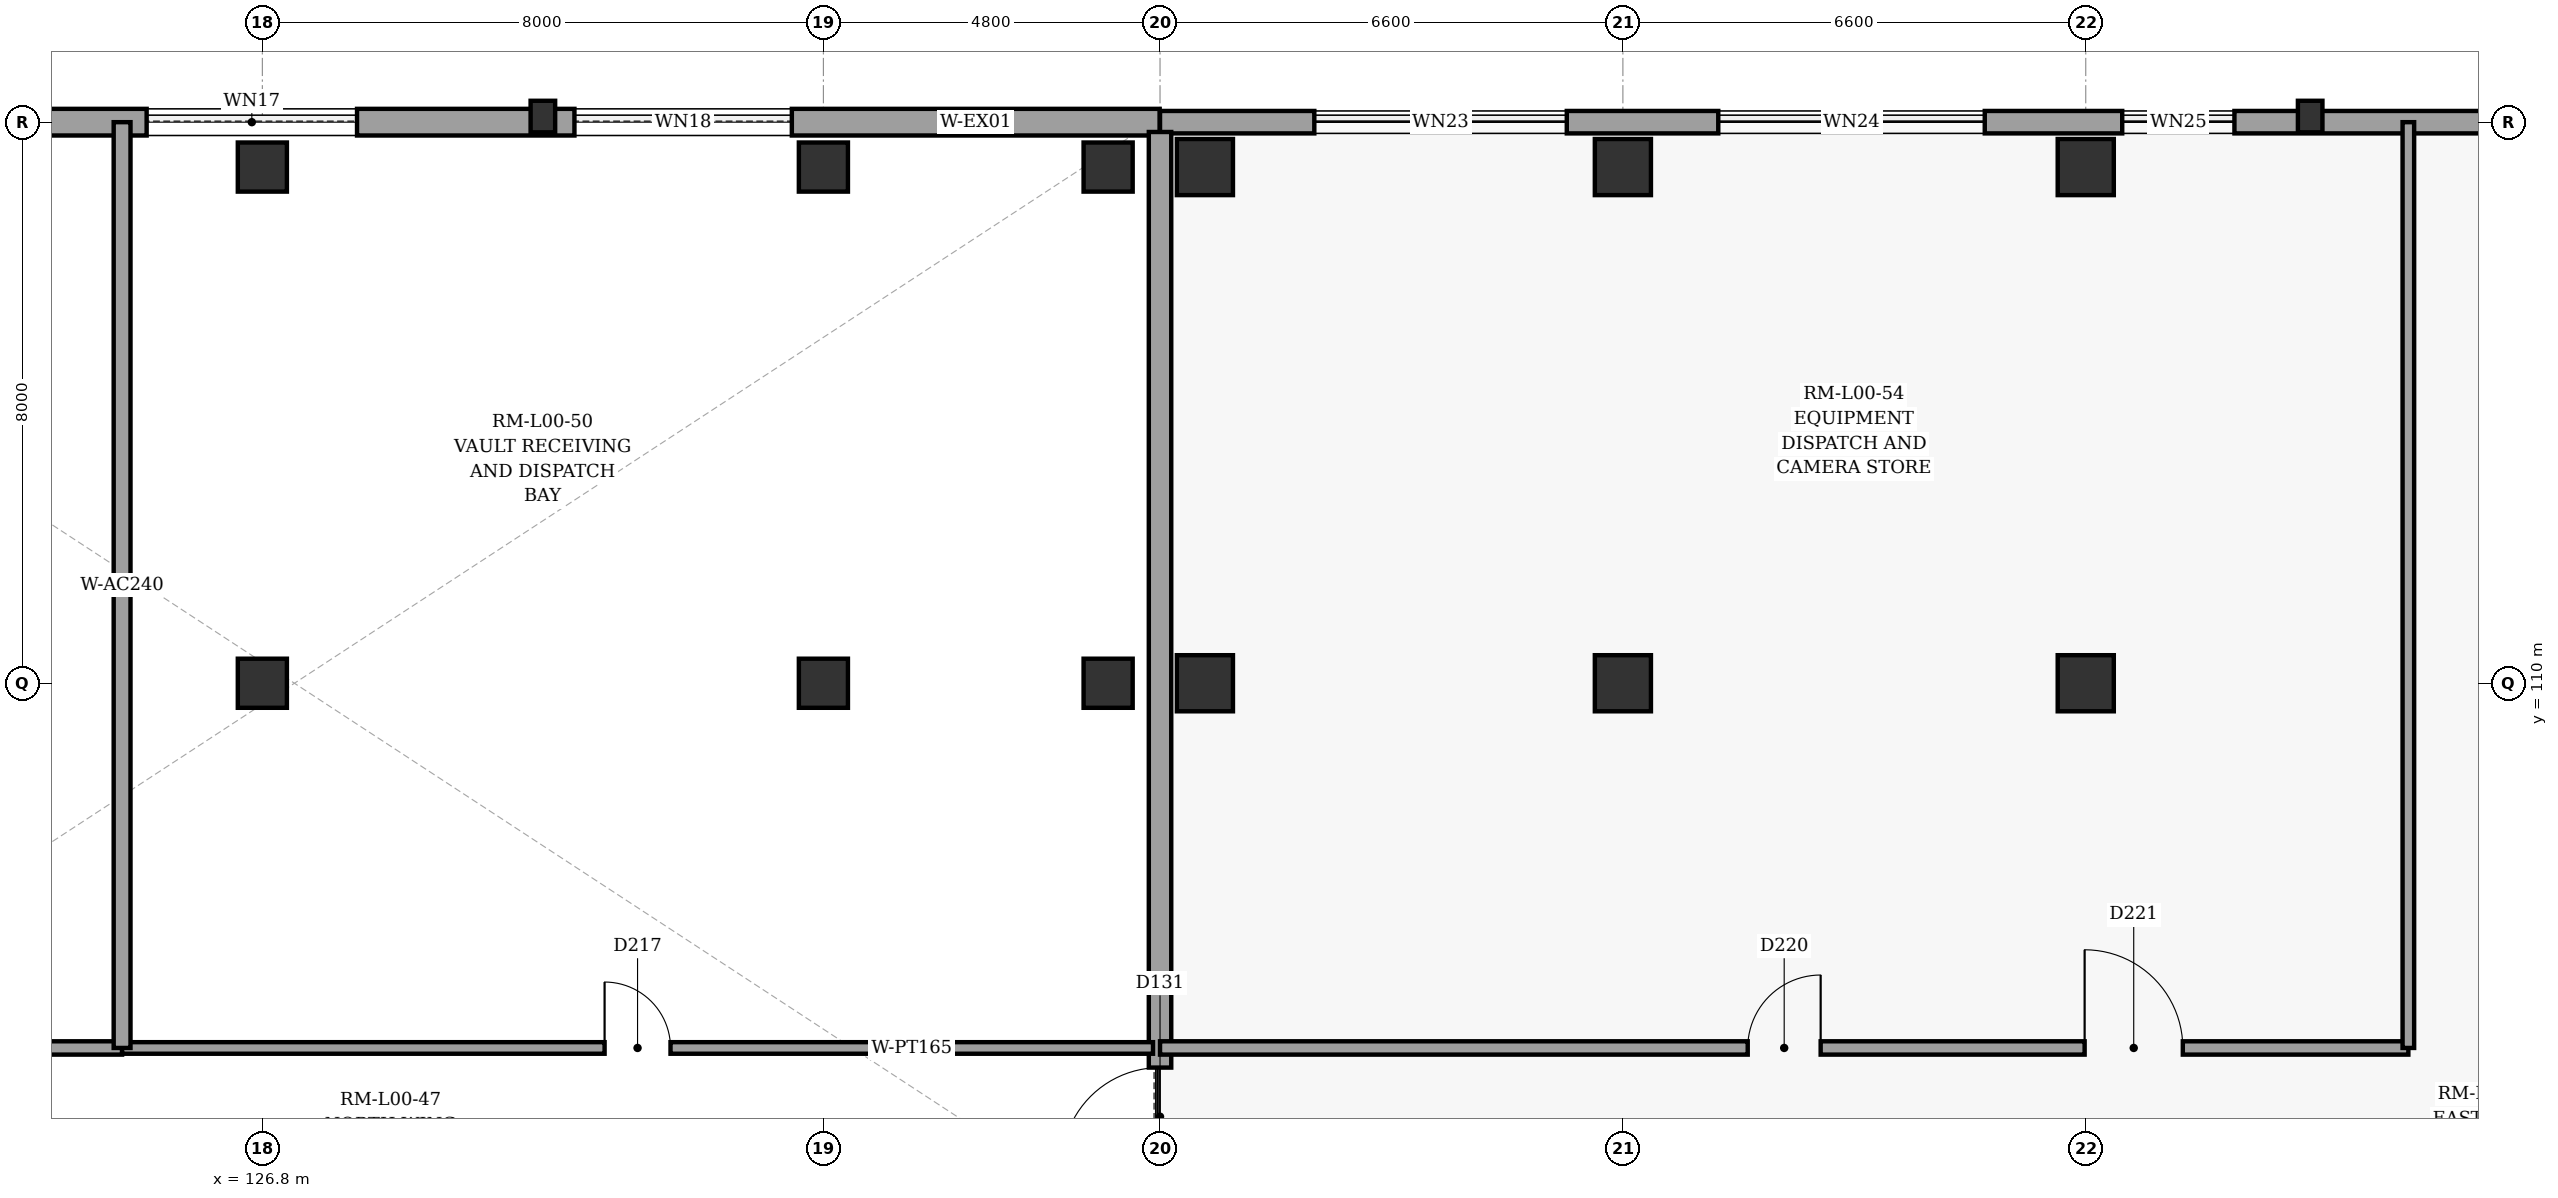
"""IFC4 building model, lengths in metres.
Left out: names, types, materials, properties, quantities, classifications, styles, units other than length and angle.
Written with IfcOpenShell. Run it as: python <this file> out.ifc"""

import sys

from ifc_helpers import new_model, si_unit, direction, frame, frame_2d, origin, origin_2d, place, context, subcontext, project, spatial, rectangle, extrude, element, fill, save


model = new_model("IFC4")
c1 = context("Model", 3, precision=1e-05, world=origin(), true_north=direction((0.0, 1.0)))
c2 = subcontext(c1, "Body", "Model", "MODEL_VIEW")
j1 = project(units=[si_unit("LENGTHUNIT", "METRE"), si_unit("PLANEANGLEUNIT", "RADIAN")], contexts=[c1])
p1 = place(None, origin())
s1 = spatial("IfcSite", under=j1, at=p1, CompositionType="ELEMENT")
p2 = place(p1, origin())
s2 = spatial("IfcBuilding", under=s1, at=p2, CompositionType="ELEMENT")
p3 = place(p2, origin())
s3 = spatial("IfcBuildingStorey", under=s2, at=p3, CompositionType="ELEMENT", Elevation=0.0)
for number, where, z_axis, x_axis in (
    (1, (126.8, 110.0, 0.0), (0.0, 0.0, 1.0), (1.0, 0.0, 0.0)),
    (2, (126.8, 117.36, 0.0), (0.0, 0.0, 1.0), (1.0, 0.0, 0.0)),
    (3, (134.8, 110.0, 0.0), (0.0, 0.0, 1.0), (1.0, 0.0, 0.0)),
    (4, (134.8, 117.36, 0.0), (0.0, 0.0, 1.0), (1.0, 0.0, 0.0)),
    (5, (138.86, 110.0, 0.0), (0.0, 0.0, 1.0), (1.0, 0.0, 0.0)),
    (6, (138.86, 117.36, 0.0), (0.0, 0.0, 1.0), (1.0, 0.0, 0.0)),
):
    element("IfcColumn", number, at=place(p3, frame(where, z_axis=z_axis, x_axis=x_axis)), inside=s3, PredefinedType="COLUMN", context=c2, shape_type="SweptSolid", body=[
        extrude(rectangle(XDim=0.7, YDim=0.7, at=origin_2d()), origin(), (0.0, 0.0, 1.0), 5.4),
    ])
for number, where, z_axis, x_axis in (
    (7, (140.24, 110.0, 0.0), (0.0, 0.0, 1.0), (1.0, 0.0, 0.0)),
    (8, (140.24, 117.36, 0.0), (0.0, 0.0, 1.0), (1.0, 0.0, 0.0)),
    (9, (146.2, 110.0, 0.0), (0.0, 0.0, 1.0), (1.0, 0.0, 0.0)),
    (10, (146.2, 117.36, 0.0), (0.0, 0.0, 1.0), (1.0, 0.0, 0.0)),
    (11, (152.8, 110.0, 0.0), (0.0, 0.0, 1.0), (1.0, 0.0, 0.0)),
    (12, (152.8, 117.36, 0.0), (0.0, 0.0, 1.0), (1.0, 0.0, 0.0)),
):
    element("IfcColumn", number, at=place(p3, frame(where, z_axis=z_axis, x_axis=x_axis)), inside=s3, PredefinedType="COLUMN", context=c2, shape_type="SweptSolid", body=[
        extrude(rectangle(XDim=0.8, YDim=0.8, at=origin_2d()), origin(), (0.0, 0.0, 1.0), 5.4),
    ])
for number, where, z_axis, x_axis in (
    (13, (130.8, 118.08, 0.0), (0.0, 0.0, 1.0), (0.0, 1.0, 0.0)),
    (14, (156.0, 118.08, 0.0), (0.0, 0.0, 1.0), (0.0, 1.0, 0.0)),
):
    element("IfcColumn", number, at=place(p3, frame(where, z_axis=z_axis, x_axis=x_axis)), inside=s3, PredefinedType="PILASTER", context=c2, shape_type="SweptSolid", body=[
        extrude(rectangle(XDim=0.35, YDim=0.45, at=origin_2d()), origin(), (0.0, 0.0, 1.0), 5.4),
    ])
p4 = place(p3, frame((94.8, 118.0, 0.0), z_axis=(0.0, 0.0, 1.0), x_axis=(1.0, 0.0, 0.0)))
e15 = element("IfcWall", 15, at=p4, inside=s3, PredefinedType="SOLIDWALL", context=c2, shape_type="SweptSolid", body=[
    extrude(rectangle(XDim=44.795, YDim=0.38, at=frame_2d((22.397, 0.0))), origin(), (0.0, 0.0, 1.0), 5.12),
])
p5 = place(p4, frame((0.75, 0.0, 0.9)))
e16 = element("IfcOpeningElement", 16, at=p5, cuts=e15, PredefinedType="OPENING", context=c2, shape_type="SweptSolid", body=[
    extrude(rectangle(XDim=2.6, YDim=2.35, at=frame_2d((1.3, 1.175))), frame((0.0, 0.2, 0.0), z_axis=(0.0, -1.0, 0.0), x_axis=(1.0, 0.0, 0.0)), (0.0, 0.0, 1.0), 0.4),
])
p6 = place(p4, frame((8.3, 0.0, 0.9)))
e17 = element("IfcOpeningElement", 17, at=p6, cuts=e15, PredefinedType="OPENING", context=c2, shape_type="SweptSolid", body=[
    extrude(rectangle(XDim=2.7, YDim=2.35, at=frame_2d((1.35, 1.175))), frame((0.0, 0.2, 0.0), z_axis=(0.0, -1.0, 0.0), x_axis=(1.0, 0.0, 0.0)), (0.0, 0.0, 1.0), 0.4),
])
p7 = place(p4, frame((15.9, 0.0, 0.9)))
e18 = element("IfcOpeningElement", 18, at=p7, cuts=e15, PredefinedType="OPENING", context=c2, shape_type="SweptSolid", body=[
    extrude(rectangle(XDim=2.8, YDim=2.4, at=frame_2d((1.4, 1.2))), frame((0.0, 0.2, 0.0), z_axis=(0.0, -1.0, 0.0), x_axis=(1.0, 0.0, 0.0)), (0.0, 0.0, 1.0), 0.4),
])
p8 = place(p4, frame((22.75, 0.0, 0.9)))
e19 = element("IfcOpeningElement", 19, at=p8, cuts=e15, PredefinedType="OPENING", context=c2, shape_type="SweptSolid", body=[
    extrude(rectangle(XDim=2.9, YDim=2.4, at=frame_2d((1.45, 1.2))), frame((0.0, 0.2, 0.0), z_axis=(0.0, -1.0, 0.0), x_axis=(1.0, 0.0, 0.0)), (0.0, 0.0, 1.0), 0.4),
])
p9 = place(p4, frame((30.35, 0.0, 0.9)))
e20 = element("IfcOpeningElement", 20, at=p9, cuts=e15, PredefinedType="OPENING", context=c2, shape_type="SweptSolid", body=[
    extrude(rectangle(XDim=3.0, YDim=2.45, at=frame_2d((1.5, 1.225))), frame((0.0, 0.2, 0.0), z_axis=(0.0, -1.0, 0.0), x_axis=(1.0, 0.0, 0.0)), (0.0, 0.0, 1.0), 0.4),
])
p10 = place(p4, frame((36.45, 0.0, 0.9)))
e21 = element("IfcOpeningElement", 21, at=p10, cuts=e15, PredefinedType="OPENING", context=c2, shape_type="SweptSolid", body=[
    extrude(rectangle(XDim=3.1, YDim=2.45, at=frame_2d((1.55, 1.225))), frame((0.0, 0.2, 0.0), z_axis=(0.0, -1.0, 0.0), x_axis=(1.0, 0.0, 0.0)), (0.0, 0.0, 1.0), 0.4),
])
p11 = place(p3, frame((139.6, 118.0, 0.0), z_axis=(0.0, 0.0, 1.0), x_axis=(1.0, 0.0, 0.0)))
e22 = element("IfcWall", 22, at=p11, inside=s3, PredefinedType="SOLIDWALL", context=c2, shape_type="SweptSolid", body=[
    extrude(rectangle(XDim=32.4, YDim=0.32, at=frame_2d((16.2, 0.0))), origin(), (0.0, 0.0, 1.0), 5.14),
])
p12 = place(p11, frame((28.5, 0.0, 0.0)))
e23 = element("IfcOpeningElement", 23, at=p12, cuts=e22, PredefinedType="OPENING", context=c2, shape_type="SweptSolid", body=[
    extrude(rectangle(XDim=2.0, YDim=2.5, at=frame_2d((1.0, 1.25))), frame((0.0, 0.17, 0.0), z_axis=(0.0, -1.0, 0.0), x_axis=(1.0, 0.0, 0.0)), (0.0, 0.0, 1.0), 0.34),
])
p13 = place(p11, frame((2.2, 0.0, 0.9)))
e24 = element("IfcOpeningElement", 24, at=p13, cuts=e22, PredefinedType="OPENING", context=c2, shape_type="SweptSolid", body=[
    extrude(rectangle(XDim=3.6, YDim=2.6, at=frame_2d((1.8, 1.3))), frame((0.0, 0.17, 0.0), z_axis=(0.0, -1.0, 0.0), x_axis=(1.0, 0.0, 0.0)), (0.0, 0.0, 1.0), 0.34),
])
p14 = place(p11, frame((7.96, 0.0, 0.9)))
e25 = element("IfcOpeningElement", 25, at=p14, cuts=e22, PredefinedType="OPENING", context=c2, shape_type="SweptSolid", body=[
    extrude(rectangle(XDim=3.8, YDim=2.6, at=frame_2d((1.9, 1.3))), frame((0.0, 0.17, 0.0), z_axis=(0.0, -1.0, 0.0), x_axis=(1.0, 0.0, 0.0)), (0.0, 0.0, 1.0), 0.34),
])
p15 = place(p11, frame((13.72, 0.0, 0.9)))
e26 = element("IfcOpeningElement", 26, at=p15, cuts=e22, PredefinedType="OPENING", context=c2, shape_type="SweptSolid", body=[
    extrude(rectangle(XDim=1.6, YDim=1.65, at=frame_2d((0.8, 0.825))), frame((0.0, 0.17, 0.0), z_axis=(0.0, -1.0, 0.0), x_axis=(1.0, 0.0, 0.0)), (0.0, 0.0, 1.0), 0.34),
])
p16 = place(p11, frame((19.48, 0.0, 0.9)))
e27 = element("IfcOpeningElement", 27, at=p16, cuts=e22, PredefinedType="OPENING", context=c2, shape_type="SweptSolid", body=[
    extrude(rectangle(XDim=1.8, YDim=1.65, at=frame_2d((0.9, 0.825))), frame((0.0, 0.17, 0.0), z_axis=(0.0, -1.0, 0.0), x_axis=(1.0, 0.0, 0.0)), (0.0, 0.0, 1.0), 0.34),
])
p17 = place(p3, frame((139.6, 71.74, 0.0), z_axis=(0.0, 0.0, 1.0), x_axis=(0.0, 1.0, 0.0)))
e28 = element("IfcWall", 28, at=p17, inside=s3, PredefinedType="SOLIDWALL", context=c2, shape_type="SweptSolid", body=[
    extrude(rectangle(XDim=46.12, YDim=0.32, at=frame_2d((23.06, 0.0))), origin(), (0.0, 0.0, 1.0), 4.29),
])
p18 = place(p17, frame((31.38, 0.0, 0.0)))
e29 = element("IfcOpeningElement", 29, at=p18, cuts=e28, PredefinedType="OPENING", context=c2, shape_type="SweptSolid", body=[
    extrude(rectangle(XDim=1.4, YDim=2.25, at=frame_2d((0.7, 1.125))), frame((0.0, 0.17, 0.0), z_axis=(0.0, -1.0, 0.0), x_axis=(1.0, 0.0, 0.0)), (0.0, 0.0, 1.0), 0.34),
])
p19 = place(p3, frame((109.8, 104.8, 0.0), z_axis=(0.0, 0.0, 1.0), x_axis=(1.0, 0.0, 0.0)))
e30 = element("IfcWall", 30, at=p19, inside=s3, PredefinedType="PARTITIONING", context=c2, shape_type="SweptSolid", body=[
    extrude(rectangle(XDim=15.0, YDim=0.19, at=frame_2d((7.5, 0.0))), origin(), (0.0, 0.0, 1.0), 5.12),
])
p20 = place(p19, frame((6.625, 0.0, 0.0)))
e31 = element("IfcOpeningElement", 31, at=p20, cuts=e30, PredefinedType="OPENING", context=c2, shape_type="SweptSolid", body=[
    extrude(rectangle(XDim=1.75, YDim=2.35, at=frame_2d((0.875, 1.175))), frame((0.0, 0.105, 0.0), z_axis=(0.0, -1.0, 0.0), x_axis=(1.0, 0.0, 0.0)), (0.0, 0.0, 1.0), 0.21),
])
p21 = place(p3, frame((124.8, 104.8, 0.0), z_axis=(0.0, 0.0, 1.0), x_axis=(1.0, 0.0, 0.0)))
e32 = element("IfcWall", 32, at=p21, inside=s3, PredefinedType="PARTITIONING", context=c2, shape_type="SweptSolid", body=[
    extrude(rectangle(XDim=14.7, YDim=0.165, at=frame_2d((7.35, 0.0))), origin(), (0.0, 0.0, 1.0), 5.12),
])
p22 = place(p21, frame((6.88, 0.0, 0.0)))
e33 = element("IfcOpeningElement", 33, at=p22, cuts=e32, PredefinedType="OPENING", context=c2, shape_type="SweptSolid", body=[
    extrude(rectangle(XDim=0.94, YDim=2.15, at=frame_2d((0.47, 1.075))), frame((0.0, 0.093, 0.0), z_axis=(0.0, -1.0, 0.0), x_axis=(1.0, 0.0, 0.0)), (0.0, 0.0, 1.0), 0.185),
])
p23 = place(p3, frame((124.8, 118.0, 0.0), z_axis=(0.0, 0.0, 1.0), x_axis=(0.0, -1.0, 0.0)))
e34 = element("IfcWall", 34, at=p23, inside=s3, PredefinedType="PARTITIONING", context=c2, shape_type="SweptSolid", body=[
    extrude(rectangle(XDim=13.2, YDim=0.24, at=frame_2d((6.6, 0.0))), origin(), (0.0, 0.0, 1.0), 5.12),
])
p24 = place(p3, frame((139.6, 104.8, 0.0), z_axis=(0.0, 0.0, 1.0), x_axis=(1.0, 0.0, 0.0)))
e35 = element("IfcWall", 35, at=p24, inside=s3, PredefinedType="PARTITIONING", context=c2, shape_type="SweptSolid", body=[
    extrude(rectangle(XDim=17.8, YDim=0.19, at=frame_2d((8.9, 0.0))), origin(), (0.0, 0.0, 1.0), 5.14),
])
p25 = place(p24, frame((8.38, 0.0, 0.0)))
e36 = element("IfcOpeningElement", 36, at=p25, cuts=e35, PredefinedType="OPENING", context=c2, shape_type="SweptSolid", body=[
    extrude(rectangle(XDim=1.04, YDim=2.2, at=frame_2d((0.52, 1.1))), frame((0.0, 0.105, 0.0), z_axis=(0.0, -1.0, 0.0), x_axis=(1.0, 0.0, 0.0)), (0.0, 0.0, 1.0), 0.21),
])
p26 = place(p24, frame((13.184, 0.0, 0.0)))
e37 = element("IfcOpeningElement", 37, at=p26, cuts=e35, PredefinedType="OPENING", context=c2, shape_type="SweptSolid", body=[
    extrude(rectangle(XDim=1.4, YDim=2.25, at=frame_2d((0.7, 1.125))), frame((0.0, 0.105, 0.0), z_axis=(0.0, -1.0, 0.0), x_axis=(1.0, 0.0, 0.0)), (0.0, 0.0, 1.0), 0.21),
])
p27 = place(p3, frame((157.4, 104.8, 0.0), z_axis=(0.0, 0.0, 1.0), x_axis=(0.0, 1.0, 0.0)))
e38 = element("IfcWall", 38, at=p27, inside=s3, PredefinedType="PARTITIONING", context=c2, shape_type="SweptSolid", body=[
    extrude(rectangle(XDim=13.2, YDim=0.165, at=frame_2d((6.6, 0.0))), origin(), (0.0, 0.0, 1.0), 5.14),
])
p28 = place(p9, origin())
e39 = element("IfcWindow", 39, at=p28, inside=s3, PartitioningType="SINGLE_PANEL", PredefinedType="WINDOW", context=c2, shape_type="SweptSolid", body=[
    extrude(rectangle(XDim=3.0, YDim=2.45, at=frame_2d((1.5, 1.225))), frame((0.0, 0.03, 0.0), z_axis=(0.0, -1.0, 0.0), x_axis=(1.0, 0.0, 0.0)), (0.0, 0.0, 1.0), 0.06),
])
fill(e20, e39)
p29 = place(p10, origin())
e40 = element("IfcWindow", 40, at=p29, inside=s3, PartitioningType="SINGLE_PANEL", PredefinedType="WINDOW", context=c2, shape_type="SweptSolid", body=[
    extrude(rectangle(XDim=3.1, YDim=2.45, at=frame_2d((1.55, 1.225))), frame((0.0, 0.03, 0.0), z_axis=(0.0, -1.0, 0.0), x_axis=(1.0, 0.0, 0.0)), (0.0, 0.0, 1.0), 0.06),
])
fill(e21, e40)
p30 = place(p13, origin())
e41 = element("IfcWindow", 41, at=p30, inside=s3, PartitioningType="SINGLE_PANEL", PredefinedType="WINDOW", context=c2, shape_type="SweptSolid", body=[
    extrude(rectangle(XDim=3.6, YDim=2.6, at=frame_2d((1.8, 1.3))), frame((0.0, 0.03, 0.0), z_axis=(0.0, -1.0, 0.0), x_axis=(1.0, 0.0, 0.0)), (0.0, 0.0, 1.0), 0.06),
])
fill(e24, e41)
p31 = place(p14, origin())
e42 = element("IfcWindow", 42, at=p31, inside=s3, PartitioningType="SINGLE_PANEL", PredefinedType="WINDOW", context=c2, shape_type="SweptSolid", body=[
    extrude(rectangle(XDim=3.8, YDim=2.6, at=frame_2d((1.9, 1.3))), frame((0.0, 0.03, 0.0), z_axis=(0.0, -1.0, 0.0), x_axis=(1.0, 0.0, 0.0)), (0.0, 0.0, 1.0), 0.06),
])
fill(e25, e42)
p32 = place(p15, origin())
e43 = element("IfcWindow", 43, at=p32, inside=s3, PartitioningType="SINGLE_PANEL", PredefinedType="WINDOW", context=c2, shape_type="SweptSolid", body=[
    extrude(rectangle(XDim=1.6, YDim=1.65, at=frame_2d((0.8, 0.825))), frame((0.0, 0.03, 0.0), z_axis=(0.0, -1.0, 0.0), x_axis=(1.0, 0.0, 0.0)), (0.0, 0.0, 1.0), 0.06),
])
fill(e26, e43)
p33 = place(p18, origin())
e44 = element("IfcDoor", 44, at=p33, inside=s3, OperationType="SINGLE_SWING_LEFT", PredefinedType="DOOR", context=c2, shape_type="SweptSolid", body=[
    extrude(rectangle(XDim=1.4, YDim=2.25, at=frame_2d((0.7, 1.125))), frame((0.0, 0.025, 0.0), z_axis=(0.0, -1.0, 0.0), x_axis=(1.0, 0.0, 0.0)), (0.0, 0.0, 1.0), 0.05),
])
fill(e29, e44)
p34 = place(p22, origin())
e45 = element("IfcDoor", 45, at=p34, inside=s3, OperationType="SINGLE_SWING_LEFT", PredefinedType="DOOR", context=c2, shape_type="SweptSolid", body=[
    extrude(rectangle(XDim=0.94, YDim=2.15, at=frame_2d((0.47, 1.075))), frame((0.0, 0.025, 0.0), z_axis=(0.0, -1.0, 0.0), x_axis=(1.0, 0.0, 0.0)), (0.0, 0.0, 1.0), 0.05),
])
fill(e33, e45)
p35 = place(p25, origin())
e46 = element("IfcDoor", 46, at=p35, inside=s3, OperationType="SINGLE_SWING_RIGHT", PredefinedType="DOOR", context=c2, shape_type="SweptSolid", body=[
    extrude(rectangle(XDim=1.04, YDim=2.2, at=frame_2d((0.52, 1.1))), frame((0.0, 0.025, 0.0), z_axis=(0.0, -1.0, 0.0), x_axis=(1.0, 0.0, 0.0)), (0.0, 0.0, 1.0), 0.05),
])
fill(e36, e46)
p36 = place(p26, origin())
e47 = element("IfcDoor", 47, at=p36, inside=s3, OperationType="SINGLE_SWING_LEFT", PredefinedType="DOOR", context=c2, shape_type="SweptSolid", body=[
    extrude(rectangle(XDim=1.4, YDim=2.25, at=frame_2d((0.7, 1.125))), frame((0.0, 0.025, 0.0), z_axis=(0.0, -1.0, 0.0), x_axis=(1.0, 0.0, 0.0)), (0.0, 0.0, 1.0), 0.05),
])
fill(e37, e47)
save(model, sys.argv[1])
